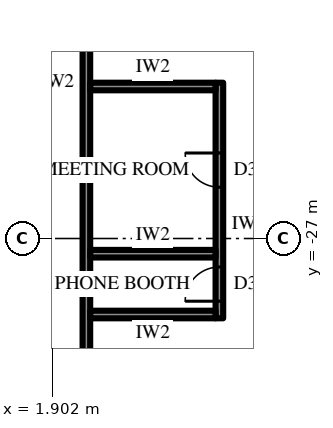
"""IFC4 building model, lengths in metres.
Left out: names, types, materials, properties, quantities, classifications, styles, units other than length and angle.
Written with IfcOpenShell. Run it as: python <this file> out.ifc"""

import sys

from ifc_helpers import new_model, si_unit, direction, frame, frame_2d, origin, place, context, subcontext, project, spatial, rectangle, extrude, element, fill, save


model = new_model("IFC4")
c1 = context("Model", 3, precision=1e-05, world=origin(), true_north=direction((0.0, 1.0)))
c2 = subcontext(c1, "Body", "Model", "MODEL_VIEW")
j1 = project(units=[si_unit("LENGTHUNIT", "METRE"), si_unit("PLANEANGLEUNIT", "RADIAN")], contexts=[c1])
p1 = place(None, origin())
s1 = spatial("IfcSite", under=j1, at=p1, CompositionType="ELEMENT")
p2 = place(p1, origin())
s2 = spatial("IfcBuilding", under=s1, at=p2, CompositionType="ELEMENT")
p3 = place(p2, frame((0.0, 0.0, 82.3)))
s3 = spatial("IfcBuildingStorey", under=s2, at=p3, CompositionType="ELEMENT", Elevation=82.3)
p4 = place(p3, frame((2.8, -18.2, 0.0), z_axis=(0.0, 0.0, 1.0), x_axis=(0.0, -1.0, 0.0)))
e1 = element("IfcWall", 1, at=p4, inside=s3, PredefinedType="PARTITIONING", context=c2, shape_type="SweptSolid", body=[
    extrude(rectangle(XDim=15.6, YDim=0.2, at=frame_2d((7.8, 0.0))), origin(), (0.0, 0.0, 1.0), 2.944),
])
p5 = place(p4, frame((1.06, 0.0, 0.0)))
e2 = element("IfcOpeningElement", 2, at=p5, cuts=e1, PredefinedType="OPENING", context=c2, shape_type="SweptSolid", body=[
    extrude(rectangle(XDim=1.0, YDim=2.2, at=frame_2d((0.5, 1.1))), frame((0.0, 0.11, 0.0), z_axis=(0.0, -1.0, 0.0), x_axis=(1.0, 0.0, 0.0)), (0.0, 0.0, 1.0), 0.22),
])
p6 = place(p3, frame((6.3, -22.9, 0.0), z_axis=(0.0, 0.0, 1.0), x_axis=(0.0, -1.0, 0.0)))
e3 = element("IfcWall", 3, at=p6, inside=s3, PredefinedType="PARTITIONING", context=c2, shape_type="SweptSolid", body=[
    extrude(rectangle(XDim=6.2, YDim=0.2, at=frame_2d((3.1, 0.0))), origin(), (0.0, 0.0, 1.0), 4.0),
])
p7 = place(p6, frame((1.85, 0.0, 0.0)))
e4 = element("IfcOpeningElement", 4, at=p7, cuts=e3, PredefinedType="OPENING", context=c2, shape_type="SweptSolid", body=[
    extrude(rectangle(XDim=0.9, YDim=2.2, at=frame_2d((0.45, 1.1))), frame((0.0, 0.11, 0.0), z_axis=(0.0, -1.0, 0.0), x_axis=(1.0, 0.0, 0.0)), (0.0, 0.0, 1.0), 0.22),
])
p8 = place(p6, frame((4.85, 0.0, 0.0)))
e5 = element("IfcOpeningElement", 5, at=p8, cuts=e3, PredefinedType="OPENING", context=c2, shape_type="SweptSolid", body=[
    extrude(rectangle(XDim=0.9, YDim=2.2, at=frame_2d((0.45, 1.1))), frame((0.0, 0.11, 0.0), z_axis=(0.0, -1.0, 0.0), x_axis=(1.0, 0.0, 0.0)), (0.0, 0.0, 1.0), 0.22),
])
for number, where, z_axis, x_axis in (
    (6, (2.9, -23.0, 0.0), (0.0, 0.0, 1.0), (1.0, 0.0, 0.0)),
    (7, (2.9, -27.4, 0.0), (0.0, 0.0, 1.0), (1.0, 0.0, 0.0)),
    (8, (2.9, -29.0, 0.0), (0.0, 0.0, 1.0), (1.0, 0.0, 0.0)),
):
    element("IfcWall", number, at=place(p3, frame(where, z_axis=z_axis, x_axis=x_axis)), inside=s3, PredefinedType="PARTITIONING", context=c2, shape_type="SweptSolid", body=[
        extrude(rectangle(XDim=3.3, YDim=0.2, at=frame_2d((1.65, 0.0))), origin(), (0.0, 0.0, 1.0), 4.0),
    ])
p9 = place(p7, frame((0.9, 0.0, 0.0), z_axis=(0.0, 0.0, 1.0), x_axis=(-1.0, 0.0, 0.0)))
e9 = element("IfcDoor", 9, at=p9, inside=s3, OperationType="SINGLE_SWING_LEFT", PredefinedType="DOOR", context=c2, shape_type="SweptSolid", body=[
    extrude(rectangle(XDim=0.9, YDim=2.2, at=frame_2d((0.45, 1.1))), frame((0.0, 0.025, 0.0), z_axis=(0.0, -1.0, 0.0), x_axis=(1.0, 0.0, 0.0)), (0.0, 0.0, 1.0), 0.05),
])
fill(e4, e9)
p10 = place(p8, frame((0.9, 0.0, 0.0), z_axis=(0.0, 0.0, 1.0), x_axis=(-1.0, 0.0, 0.0)))
e10 = element("IfcDoor", 10, at=p10, inside=s3, OperationType="SINGLE_SWING_RIGHT", PredefinedType="DOOR", context=c2, shape_type="SweptSolid", body=[
    extrude(rectangle(XDim=0.9, YDim=2.2, at=frame_2d((0.45, 1.1))), frame((0.0, 0.025, 0.0), z_axis=(0.0, -1.0, 0.0), x_axis=(1.0, 0.0, 0.0)), (0.0, 0.0, 1.0), 0.05),
])
fill(e5, e10)
save(model, sys.argv[1])
